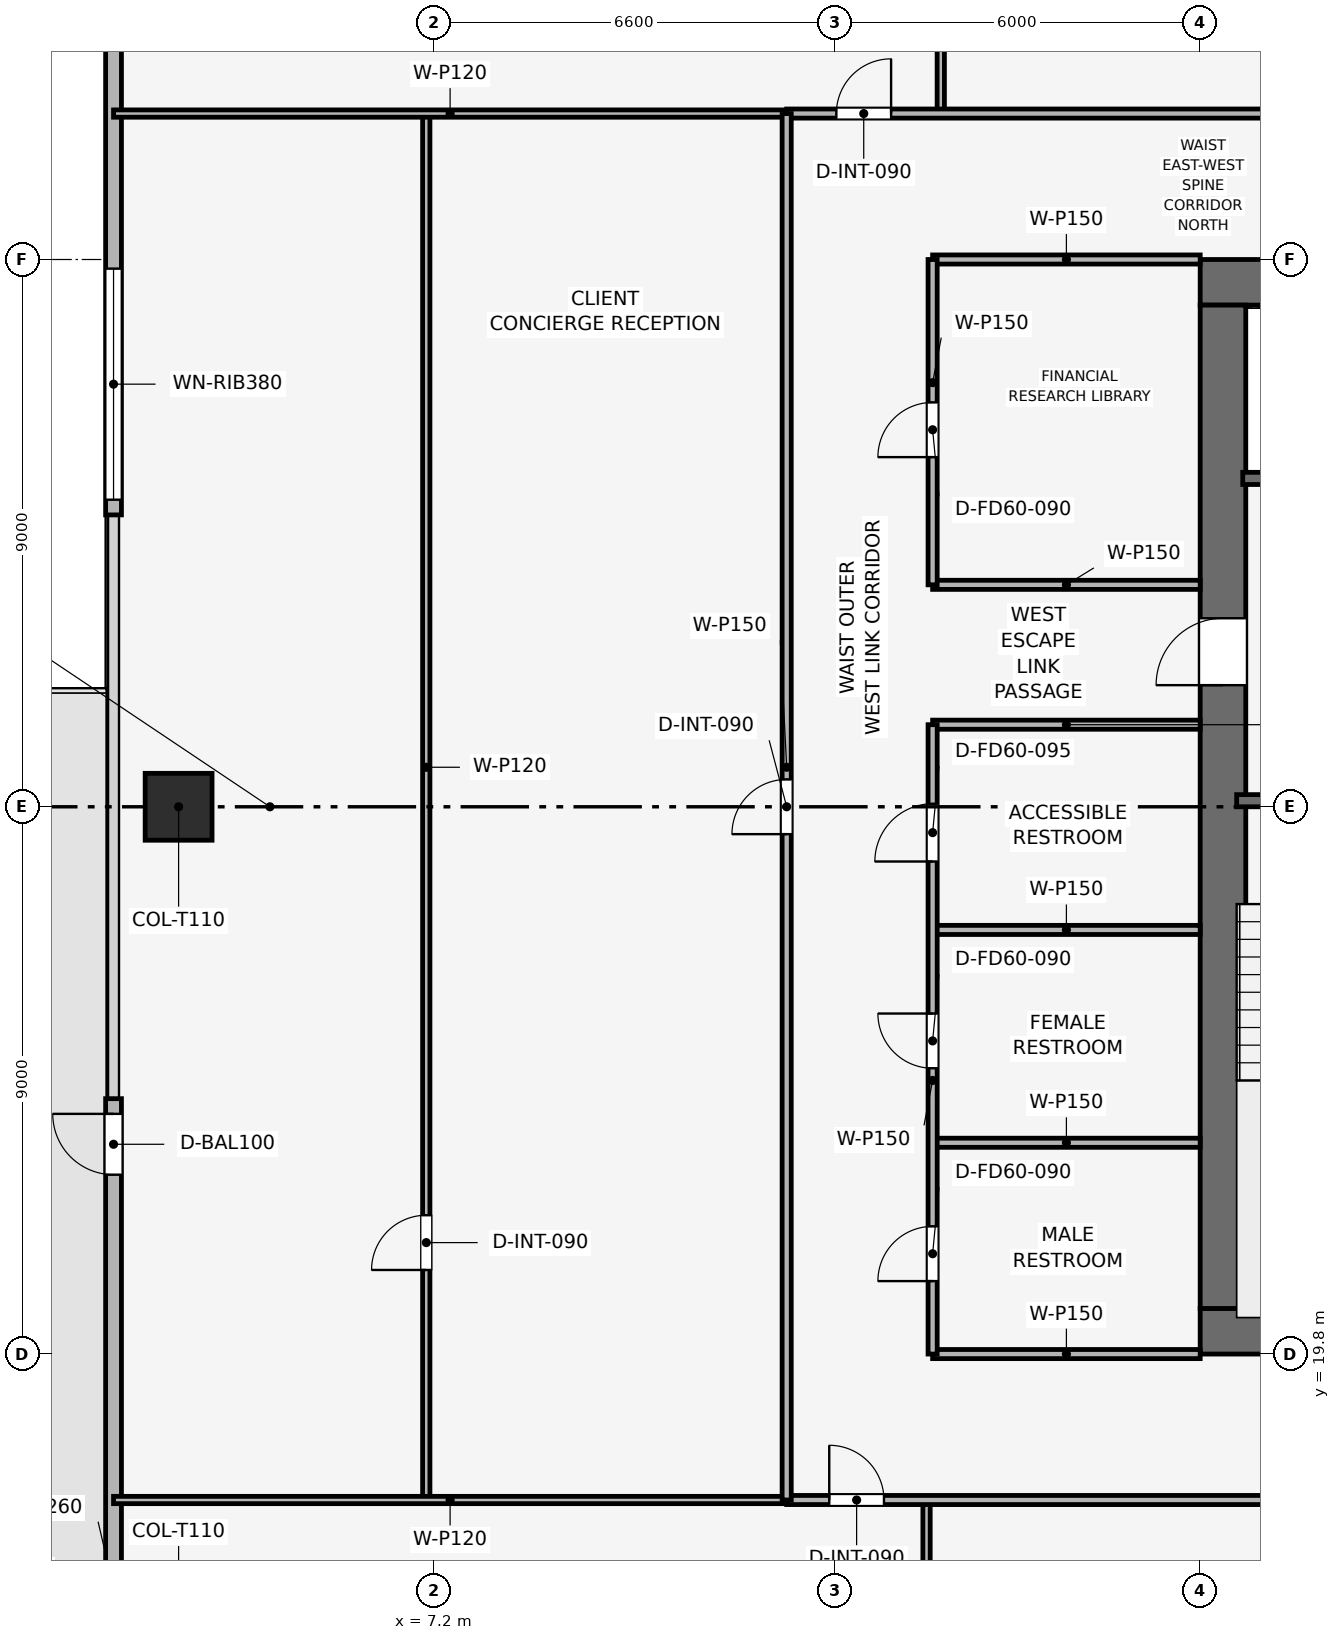
"""IFC4 building model, lengths in metres.
Left out: names, types, materials, properties, quantities, classifications, styles, units other than length and angle.
Written with IfcOpenShell. Run it as: python <this file> out.ifc"""

import sys

from ifc_helpers import new_model, si_unit, direction, frame, frame_2d, origin, origin_2d, place, context, subcontext, project, spatial, rectangle, extrude, element, fill, save


model = new_model("IFC4")
c1 = context("Model", 3, precision=1e-05, world=origin(), true_north=direction((0.0, 1.0)))
c2 = subcontext(c1, "Body", "Model", "MODEL_VIEW")
j1 = project(units=[si_unit("LENGTHUNIT", "METRE"), si_unit("PLANEANGLEUNIT", "RADIAN")], contexts=[c1])
p1 = place(None, origin())
s1 = spatial("IfcSite", under=j1, at=p1, CompositionType="ELEMENT")
p2 = place(p1, origin())
s2 = spatial("IfcBuilding", under=s1, at=p2, CompositionType="ELEMENT")
p3 = place(p2, frame((0.0, 0.0, 226.2)))
s3 = spatial("IfcBuildingStorey", under=s2, at=p3, CompositionType="ELEMENT", Elevation=226.2)
p4 = place(p3, frame((19.8, 20.175, 0.0), z_axis=(0.0, 0.0, 1.0), x_axis=(1.0, 0.0, 0.0)))
e1 = element("IfcWall", 1, at=p4, inside=s3, PredefinedType="SHEAR", context=c2, shape_type="SweptSolid", body=[
    extrude(rectangle(XDim=18.0, YDim=0.75, at=frame_2d((9.0, 0.0))), origin(), (0.0, 0.0, 1.0), 3.75),
])
p5 = place(p4, frame((8.4, 0.0, 0.0)))
e2 = element("IfcOpeningElement", 2, at=p5, cuts=e1, PredefinedType="OPENING", context=c2, shape_type="SweptSolid", body=[
    extrude(rectangle(XDim=1.2, YDim=2.2, at=frame_2d((0.6, 1.1))), frame((0.0, 0.385, 0.0), z_axis=(0.0, -1.0, 0.0), x_axis=(1.0, 0.0, 0.0)), (0.0, 0.0, 1.0), 0.77),
])
p6 = place(p3, frame((19.8, 37.425, 0.0), z_axis=(0.0, 0.0, 1.0), x_axis=(1.0, 0.0, 0.0)))
e3 = element("IfcWall", 3, at=p6, inside=s3, PredefinedType="SHEAR", context=c2, shape_type="SweptSolid", body=[
    extrude(rectangle(XDim=18.0, YDim=0.75, at=frame_2d((9.0, 0.0))), origin(), (0.0, 0.0, 1.0), 3.75),
])
p7 = place(p6, frame((7.05, 0.0, 0.0)))
e4 = element("IfcOpeningElement", 4, at=p7, cuts=e3, PredefinedType="OPENING", context=c2, shape_type="SweptSolid", body=[
    extrude(rectangle(XDim=1.1, YDim=2.15, at=frame_2d((0.55, 1.075))), frame((0.0, 0.385, 0.0), z_axis=(0.0, -1.0, 0.0), x_axis=(1.0, 0.0, 0.0)), (0.0, 0.0, 1.0), 0.77),
])
p8 = place(p3, frame((20.175, 20.55, 0.0), z_axis=(0.0, 0.0, 1.0), x_axis=(0.0, 1.0, 0.0)))
e5 = element("IfcWall", 5, at=p8, inside=s3, PredefinedType="SHEAR", context=c2, shape_type="SweptSolid", body=[
    extrude(rectangle(XDim=16.5, YDim=0.75, at=frame_2d((8.25, 0.0))), origin(), (0.0, 0.0, 1.0), 3.75),
])
p9 = place(p8, frame((10.25, 0.0, 0.0)))
e6 = element("IfcOpeningElement", 6, at=p9, cuts=e5, PredefinedType="OPENING", context=c2, shape_type="SweptSolid", body=[
    extrude(rectangle(XDim=1.1, YDim=2.15, at=frame_2d((0.55, 1.075))), frame((0.0, 0.385, 0.0), z_axis=(0.0, -1.0, 0.0), x_axis=(1.0, 0.0, 0.0)), (0.0, 0.0, 1.0), 0.77),
])
p10 = place(p3, frame((3.0, 28.8, 0.003), z_axis=(0.0, 0.0, 1.0), x_axis=(1.0, 0.0, 0.0)))
e7 = element("IfcColumn", 7, at=p10, inside=s3, PredefinedType="COLUMN", context=c2, shape_type="SweptSolid", body=[
    extrude(rectangle(XDim=1.1, YDim=1.1, at=origin_2d()), origin(), (0.0, 0.0, 1.0), 3.494),
])
p11 = place(p3, frame((1.93, 9.3, 0.0), z_axis=(0.0, 0.0, 1.0), x_axis=(0.0, 1.0, 0.0)))
e8 = element("IfcWall", 8, at=p11, inside=s3, PredefinedType="SOLIDWALL", context=c2, shape_type="SweptSolid", body=[
    extrude(rectangle(XDim=14.7, YDim=0.26, at=frame_2d((7.35, 0.0))), origin(), (0.0, 0.0, 1.0), 3.5),
])
p12 = place(p11, frame((13.45, 0.0, 0.0)))
e9 = element("IfcOpeningElement", 9, at=p12, cuts=e8, PredefinedType="OPENING", context=c2, shape_type="SweptSolid", body=[
    extrude(rectangle(XDim=1.0, YDim=2.2, at=frame_2d((0.5, 1.1))), frame((0.0, 0.14, 0.0), z_axis=(0.0, -1.0, 0.0), x_axis=(1.0, 0.0, 0.0)), (0.0, 0.0, 1.0), 0.28),
])
p13 = place(p3, frame((1.93, 33.6, 0.0), z_axis=(0.0, 0.0, 1.0), x_axis=(0.0, 1.0, 0.0)))
e10 = element("IfcWall", 10, at=p13, inside=s3, PredefinedType="SOLIDWALL", context=c2, shape_type="SweptSolid", body=[
    extrude(rectangle(XDim=14.7, YDim=0.26, at=frame_2d((7.35, 0.0))), origin(), (0.0, 0.0, 1.0), 3.5),
])
p14 = place(p13, frame((0.25, 0.0, 0.9)))
e11 = element("IfcOpeningElement", 11, at=p14, cuts=e10, PredefinedType="OPENING", context=c2, shape_type="SweptSolid", body=[
    extrude(rectangle(XDim=3.8, YDim=1.9, at=frame_2d((1.9, 0.95))), frame((0.0, 0.14, 0.0), z_axis=(0.0, -1.0, 0.0), x_axis=(1.0, 0.0, 0.0)), (0.0, 0.0, 1.0), 0.28),
])
p15 = place(p3, frame((20.4, 28.9, 0.0), z_axis=(0.0, 0.0, 1.0), x_axis=(1.0, 0.0, 0.0)))
e12 = element("IfcWall", 12, at=p15, inside=s3, PredefinedType="SHEAR", context=c2, shape_type="SweptSolid", body=[
    extrude(rectangle(XDim=3.15, YDim=0.2, at=frame_2d((1.575, 0.0))), origin(), (0.0, 0.0, 1.0), 3.5),
])
p16 = place(p15, frame((0.8, 0.0, 0.0)))
e13 = element("IfcOpeningElement", 13, at=p16, cuts=e12, PredefinedType="OPENING", context=c2, shape_type="SweptSolid", body=[
    extrude(rectangle(XDim=1.0, YDim=2.1, at=frame_2d((0.5, 1.05))), frame((0.0, 0.11, 0.0), z_axis=(0.0, -1.0, 0.0), x_axis=(1.0, 0.0, 0.0)), (0.0, 0.0, 1.0), 0.22),
])
p17 = place(p3, frame((20.5, 34.2, 0.0), z_axis=(0.0, 0.0, 1.0), x_axis=(1.0, 0.0, 0.0)))
e14 = element("IfcWall", 14, at=p17, inside=s3, PredefinedType="SHEAR", context=c2, shape_type="SweptSolid", body=[
    extrude(rectangle(XDim=3.05, YDim=0.2, at=frame_2d((1.525, 0.0))), origin(), (0.0, 0.0, 1.0), 3.5),
])
p18 = place(p17, frame((0.75, 0.0, 0.0)))
e15 = element("IfcOpeningElement", 15, at=p18, cuts=e14, PredefinedType="OPENING", context=c2, shape_type="SweptSolid", body=[
    extrude(rectangle(XDim=1.1, YDim=2.15, at=frame_2d((0.55, 1.075))), frame((0.0, 0.11, 0.0), z_axis=(0.0, -1.0, 0.0), x_axis=(1.0, 0.0, 0.0)), (0.0, 0.0, 1.0), 0.22),
])
p19 = place(p3, frame((15.4, 19.8, 0.0), z_axis=(0.0, 0.0, 1.0), x_axis=(1.0, 0.0, 0.0)))
e16 = element("IfcWall", 16, at=p19, inside=s3, PredefinedType="PARTITIONING", context=c2, shape_type="SweptSolid", body=[
    extrude(rectangle(XDim=4.4, YDim=0.15, at=frame_2d((2.2, 0.0))), origin(), (0.0, 0.0, 1.0), 3.035),
])
for number, where, z_axis, x_axis in (
    (17, (15.4, 23.275, 0.0), (0.0, 0.0, 1.0), (1.0, 0.0, 0.0)),
    (18, (15.4, 26.775, 0.0), (0.0, 0.0, 1.0), (1.0, 0.0, 0.0)),
    (19, (15.4, 30.15, 0.0), (0.0, 0.0, 1.0), (1.0, 0.0, 0.0)),
    (20, (15.4, 32.45, 0.0), (0.0, 0.0, 1.0), (1.0, 0.0, 0.0)),
):
    element("IfcWall", number, at=place(p3, frame(where, z_axis=z_axis, x_axis=x_axis)), inside=s3, PredefinedType="PARTITIONING", context=c2, shape_type="SweptSolid", body=[
        extrude(rectangle(XDim=4.4, YDim=0.15, at=frame_2d((2.2, 0.0))), origin(), (0.0, 0.0, 1.0), 3.5),
    ])
p20 = place(p3, frame((15.4, 37.8, 0.0), z_axis=(0.0, 0.0, 1.0), x_axis=(1.0, 0.0, 0.0)))
e21 = element("IfcWall", 21, at=p20, inside=s3, PredefinedType="PARTITIONING", context=c2, shape_type="SweptSolid", body=[
    extrude(rectangle(XDim=4.4, YDim=0.15, at=frame_2d((2.2, 0.0))), origin(), (0.0, 0.0, 1.0), 3.035),
])
p21 = place(p3, frame((15.4, 19.8, 0.0), z_axis=(0.0, 0.0, 1.0), x_axis=(0.0, 1.0, 0.0)))
e22 = element("IfcWall", 22, at=p21, inside=s3, PredefinedType="PARTITIONING", context=c2, shape_type="SweptSolid", body=[
    extrude(rectangle(XDim=10.35, YDim=0.15, at=frame_2d((5.175, 0.0))), origin(), (0.0, 0.0, 1.0), 3.035),
])
p22 = place(p21, frame((1.2, 0.0, 0.0)))
e23 = element("IfcOpeningElement", 23, at=p22, cuts=e22, PredefinedType="OPENING", context=c2, shape_type="SweptSolid", body=[
    extrude(rectangle(XDim=0.9, YDim=2.1, at=frame_2d((0.45, 1.05))), frame((0.0, 0.085, 0.0), z_axis=(0.0, -1.0, 0.0), x_axis=(1.0, 0.0, 0.0)), (0.0, 0.0, 1.0), 0.17),
])
p23 = place(p21, frame((4.7, 0.0, 0.0)))
e24 = element("IfcOpeningElement", 24, at=p23, cuts=e22, PredefinedType="OPENING", context=c2, shape_type="SweptSolid", body=[
    extrude(rectangle(XDim=0.9, YDim=2.1, at=frame_2d((0.45, 1.05))), frame((0.0, 0.085, 0.0), z_axis=(0.0, -1.0, 0.0), x_axis=(1.0, 0.0, 0.0)), (0.0, 0.0, 1.0), 0.17),
])
p24 = place(p21, frame((8.1, 0.0, 0.0)))
e25 = element("IfcOpeningElement", 25, at=p24, cuts=e22, PredefinedType="OPENING", context=c2, shape_type="SweptSolid", body=[
    extrude(rectangle(XDim=0.95, YDim=2.1, at=frame_2d((0.475, 1.05))), frame((0.0, 0.085, 0.0), z_axis=(0.0, -1.0, 0.0), x_axis=(1.0, 0.0, 0.0)), (0.0, 0.0, 1.0), 0.17),
])
p25 = place(p3, frame((15.4, 32.45, 0.0), z_axis=(0.0, 0.0, 1.0), x_axis=(0.0, 1.0, 0.0)))
e26 = element("IfcWall", 26, at=p25, inside=s3, PredefinedType="PARTITIONING", context=c2, shape_type="SweptSolid", body=[
    extrude(rectangle(XDim=5.35, YDim=0.15, at=frame_2d((2.675, 0.0))), origin(), (0.0, 0.0, 1.0), 3.035),
])
p26 = place(p25, frame((2.1, 0.0, 0.0)))
e27 = element("IfcOpeningElement", 27, at=p26, cuts=e26, PredefinedType="OPENING", context=c2, shape_type="SweptSolid", body=[
    extrude(rectangle(XDim=0.9, YDim=2.1, at=frame_2d((0.45, 1.05))), frame((0.0, 0.085, 0.0), z_axis=(0.0, -1.0, 0.0), x_axis=(1.0, 0.0, 0.0)), (0.0, 0.0, 1.0), 0.17),
])
for number, where, z_axis, x_axis in (
    (28, (15.3, 1.93, 0.0), (0.0, 0.0, 1.0), (0.0, 1.0, 0.0)),
    (29, (15.534, 40.2, 0.0), (0.0, 0.0, 1.0), (0.0, 1.0, 0.0)),
):
    element("IfcWall", number, at=place(p3, frame(where, z_axis=z_axis, x_axis=x_axis)), inside=s3, PredefinedType="PARTITIONING", context=c2, shape_type="SweptSolid", body=[
        extrude(rectangle(XDim=15.47, YDim=0.12, at=frame_2d((7.735, 0.0))), origin(), (0.0, 0.0, 1.0), 2.885),
    ])
p27 = place(p3, frame((7.073, 17.4, 0.0), z_axis=(0.0, 0.0, 1.0), x_axis=(0.0, 1.0, 0.0)))
e30 = element("IfcWall", 30, at=p27, inside=s3, PredefinedType="PARTITIONING", context=c2, shape_type="SweptSolid", body=[
    extrude(rectangle(XDim=22.8, YDim=0.12, at=frame_2d((11.4, 0.0))), origin(), (0.0, 0.0, 1.0), 3.035),
])
p28 = place(p27, frame((3.783, 0.0, 0.0)))
e31 = element("IfcOpeningElement", 31, at=p28, cuts=e30, PredefinedType="OPENING", context=c2, shape_type="SweptSolid", body=[
    extrude(rectangle(XDim=0.9, YDim=2.1, at=frame_2d((0.45, 1.05))), frame((0.0, 0.07, 0.0), z_axis=(0.0, -1.0, 0.0), x_axis=(1.0, 0.0, 0.0)), (0.0, 0.0, 1.0), 0.14),
])
for number, where, z_axis, x_axis in (
    (32, (1.93, 17.4, 0.0), (0.0, 0.0, 1.0), (1.0, 0.0, 0.0)),
    (33, (1.93, 40.2, 0.0), (0.0, 0.0, 1.0), (1.0, 0.0, 0.0)),
):
    element("IfcWall", number, at=place(p3, frame(where, z_axis=z_axis, x_axis=x_axis)), inside=s3, PredefinedType="PARTITIONING", context=c2, shape_type="SweptSolid", body=[
        extrude(rectangle(XDim=11.07, YDim=0.12, at=frame_2d((5.535, 0.0))), origin(), (0.0, 0.0, 1.0), 2.885),
    ])
p29 = place(p3, frame((13.0, 17.4, 0.0), z_axis=(0.0, 0.0, 1.0), x_axis=(1.0, 0.0, 0.0)))
e34 = element("IfcWall", 34, at=p29, inside=s3, PredefinedType="PARTITIONING", context=c2, shape_type="SweptSolid", body=[
    extrude(rectangle(XDim=31.6, YDim=0.15, at=frame_2d((15.8, 0.0))), origin(), (0.0, 0.0, 1.0), 3.035),
])
p30 = place(p29, frame((0.7, 0.0, 0.0)))
e35 = element("IfcOpeningElement", 35, at=p30, cuts=e34, PredefinedType="OPENING", context=c2, shape_type="SweptSolid", body=[
    extrude(rectangle(XDim=0.9, YDim=2.1, at=frame_2d((0.45, 1.05))), frame((0.0, 0.085, 0.0), z_axis=(0.0, -1.0, 0.0), x_axis=(1.0, 0.0, 0.0)), (0.0, 0.0, 1.0), 0.17),
])
p31 = place(p29, frame((8.483, 0.0, 0.0)))
e36 = element("IfcOpeningElement", 36, at=p31, cuts=e34, PredefinedType="OPENING", context=c2, shape_type="SweptSolid", body=[
    extrude(rectangle(XDim=0.9, YDim=2.1, at=frame_2d((0.45, 1.05))), frame((0.0, 0.085, 0.0), z_axis=(0.0, -1.0, 0.0), x_axis=(1.0, 0.0, 0.0)), (0.0, 0.0, 1.0), 0.17),
])
p32 = place(p29, frame((23.133, 0.0, 0.0)))
e37 = element("IfcOpeningElement", 37, at=p32, cuts=e34, PredefinedType="OPENING", context=c2, shape_type="SweptSolid", body=[
    extrude(rectangle(XDim=0.9, YDim=2.1, at=frame_2d((0.45, 1.05))), frame((0.0, 0.085, 0.0), z_axis=(0.0, -1.0, 0.0), x_axis=(1.0, 0.0, 0.0)), (0.0, 0.0, 1.0), 0.17),
])
p33 = place(p3, frame((13.0, 40.2, 0.0), z_axis=(0.0, 0.0, 1.0), x_axis=(1.0, 0.0, 0.0)))
e38 = element("IfcWall", 38, at=p33, inside=s3, PredefinedType="PARTITIONING", context=c2, shape_type="SweptSolid", body=[
    extrude(rectangle(XDim=31.6, YDim=0.15, at=frame_2d((15.8, 0.0))), origin(), (0.0, 0.0, 1.0), 3.035),
])
p34 = place(p33, frame((0.817, 0.0, 0.0)))
e39 = element("IfcOpeningElement", 39, at=p34, cuts=e38, PredefinedType="OPENING", context=c2, shape_type="SweptSolid", body=[
    extrude(rectangle(XDim=0.9, YDim=2.1, at=frame_2d((0.45, 1.05))), frame((0.0, 0.085, 0.0), z_axis=(0.0, -1.0, 0.0), x_axis=(1.0, 0.0, 0.0)), (0.0, 0.0, 1.0), 0.17),
])
p35 = place(p33, frame((8.75, 0.0, 0.0)))
e40 = element("IfcOpeningElement", 40, at=p35, cuts=e38, PredefinedType="OPENING", context=c2, shape_type="SweptSolid", body=[
    extrude(rectangle(XDim=0.9, YDim=2.1, at=frame_2d((0.45, 1.05))), frame((0.0, 0.085, 0.0), z_axis=(0.0, -1.0, 0.0), x_axis=(1.0, 0.0, 0.0)), (0.0, 0.0, 1.0), 0.17),
])
p36 = place(p33, frame((23.282, 0.0, 0.0)))
e41 = element("IfcOpeningElement", 41, at=p36, cuts=e38, PredefinedType="OPENING", context=c2, shape_type="SweptSolid", body=[
    extrude(rectangle(XDim=0.9, YDim=2.1, at=frame_2d((0.45, 1.05))), frame((0.0, 0.085, 0.0), z_axis=(0.0, -1.0, 0.0), x_axis=(1.0, 0.0, 0.0)), (0.0, 0.0, 1.0), 0.17),
])
p37 = place(p3, frame((13.0, 17.4, 0.0), z_axis=(0.0, 0.0, 1.0), x_axis=(0.0, 1.0, 0.0)))
e42 = element("IfcWall", 42, at=p37, inside=s3, PredefinedType="PARTITIONING", context=c2, shape_type="SweptSolid", body=[
    extrude(rectangle(XDim=22.8, YDim=0.15, at=frame_2d((11.4, 0.0))), origin(), (0.0, 0.0, 1.0), 3.035),
])
p38 = place(p37, frame((10.95, 0.0, 0.0)))
e43 = element("IfcOpeningElement", 43, at=p38, cuts=e42, PredefinedType="OPENING", context=c2, shape_type="SweptSolid", body=[
    extrude(rectangle(XDim=0.9, YDim=2.1, at=frame_2d((0.45, 1.05))), frame((0.0, 0.085, 0.0), z_axis=(0.0, -1.0, 0.0), x_axis=(1.0, 0.0, 0.0)), (0.0, 0.0, 1.0), 0.17),
])
p39 = place(p12, origin())
e44 = element("IfcDoor", 44, at=p39, inside=s3, OperationType="SINGLE_SWING_RIGHT", PredefinedType="DOOR", context=c2, shape_type="SweptSolid", body=[
    extrude(rectangle(XDim=1.0, YDim=2.2, at=frame_2d((0.5, 1.1))), frame((0.0, 0.025, 0.0), z_axis=(0.0, -1.0, 0.0), x_axis=(1.0, 0.0, 0.0)), (0.0, 0.0, 1.0), 0.05),
])
fill(e9, e44)
p40 = place(p14, origin())
e45 = element("IfcWindow", 45, at=p40, inside=s3, PartitioningType="SINGLE_PANEL", PredefinedType="WINDOW", context=c2, shape_type="SweptSolid", body=[
    extrude(rectangle(XDim=3.8, YDim=1.9, at=frame_2d((1.9, 0.95))), frame((0.0, 0.03, 0.0), z_axis=(0.0, -1.0, 0.0), x_axis=(1.0, 0.0, 0.0)), (0.0, 0.0, 1.0), 0.06),
])
fill(e11, e45)
p41 = place(p22, origin())
e46 = element("IfcDoor", 46, at=p41, inside=s3, OperationType="SINGLE_SWING_LEFT", PredefinedType="DOOR", context=c2, shape_type="SweptSolid", body=[
    extrude(rectangle(XDim=0.9, YDim=2.1, at=frame_2d((0.45, 1.05))), frame((0.0, 0.025, 0.0), z_axis=(0.0, -1.0, 0.0), x_axis=(1.0, 0.0, 0.0)), (0.0, 0.0, 1.0), 0.05),
])
fill(e23, e46)
p42 = place(p23, origin())
e47 = element("IfcDoor", 47, at=p42, inside=s3, OperationType="SINGLE_SWING_RIGHT", PredefinedType="DOOR", context=c2, shape_type="SweptSolid", body=[
    extrude(rectangle(XDim=0.9, YDim=2.1, at=frame_2d((0.45, 1.05))), frame((0.0, 0.025, 0.0), z_axis=(0.0, -1.0, 0.0), x_axis=(1.0, 0.0, 0.0)), (0.0, 0.0, 1.0), 0.05),
])
fill(e24, e47)
p43 = place(p24, origin())
e48 = element("IfcDoor", 48, at=p43, inside=s3, OperationType="SINGLE_SWING_LEFT", PredefinedType="DOOR", context=c2, shape_type="SweptSolid", body=[
    extrude(rectangle(XDim=0.95, YDim=2.1, at=frame_2d((0.475, 1.05))), frame((0.0, 0.025, 0.0), z_axis=(0.0, -1.0, 0.0), x_axis=(1.0, 0.0, 0.0)), (0.0, 0.0, 1.0), 0.05),
])
fill(e25, e48)
p44 = place(p26, origin())
e49 = element("IfcDoor", 49, at=p44, inside=s3, OperationType="SINGLE_SWING_LEFT", PredefinedType="DOOR", context=c2, shape_type="SweptSolid", body=[
    extrude(rectangle(XDim=0.9, YDim=2.1, at=frame_2d((0.45, 1.05))), frame((0.0, 0.025, 0.0), z_axis=(0.0, -1.0, 0.0), x_axis=(1.0, 0.0, 0.0)), (0.0, 0.0, 1.0), 0.05),
])
fill(e27, e49)
p45 = place(p28, origin())
e50 = element("IfcDoor", 50, at=p45, inside=s3, OperationType="SINGLE_SWING_LEFT", PredefinedType="DOOR", context=c2, shape_type="SweptSolid", body=[
    extrude(rectangle(XDim=0.9, YDim=2.1, at=frame_2d((0.45, 1.05))), frame((0.0, 0.025, 0.0), z_axis=(0.0, -1.0, 0.0), x_axis=(1.0, 0.0, 0.0)), (0.0, 0.0, 1.0), 0.05),
])
fill(e31, e50)
p46 = place(p30, origin())
e51 = element("IfcDoor", 51, at=p46, inside=s3, OperationType="SINGLE_SWING_LEFT", PredefinedType="DOOR", context=c2, shape_type="SweptSolid", body=[
    extrude(rectangle(XDim=0.9, YDim=2.1, at=frame_2d((0.45, 1.05))), frame((0.0, 0.025, 0.0), z_axis=(0.0, -1.0, 0.0), x_axis=(1.0, 0.0, 0.0)), (0.0, 0.0, 1.0), 0.05),
])
fill(e35, e51)
p47 = place(p34, origin())
e52 = element("IfcDoor", 52, at=p47, inside=s3, OperationType="SINGLE_SWING_RIGHT", PredefinedType="DOOR", context=c2, shape_type="SweptSolid", body=[
    extrude(rectangle(XDim=0.9, YDim=2.1, at=frame_2d((0.45, 1.05))), frame((0.0, 0.025, 0.0), z_axis=(0.0, -1.0, 0.0), x_axis=(1.0, 0.0, 0.0)), (0.0, 0.0, 1.0), 0.05),
])
fill(e39, e52)
p48 = place(p38, origin())
e53 = element("IfcDoor", 53, at=p48, inside=s3, OperationType="SINGLE_SWING_LEFT", PredefinedType="DOOR", context=c2, shape_type="SweptSolid", body=[
    extrude(rectangle(XDim=0.9, YDim=2.1, at=frame_2d((0.45, 1.05))), frame((0.0, 0.025, 0.0), z_axis=(0.0, -1.0, 0.0), x_axis=(1.0, 0.0, 0.0)), (0.0, 0.0, 1.0), 0.05),
])
fill(e43, e53)
p49 = place(p9, origin())
e54 = element("IfcDoor", 54, at=p49, inside=s3, OperationType="SINGLE_SWING_LEFT", PredefinedType="DOOR", context=c2, shape_type="SweptSolid", body=[
    extrude(rectangle(XDim=1.1, YDim=2.15, at=frame_2d((0.55, 1.075))), frame((0.0, 0.025, 0.0), z_axis=(0.0, -1.0, 0.0), x_axis=(1.0, 0.0, 0.0)), (0.0, 0.0, 1.0), 0.05),
])
fill(e6, e54)
save(model, sys.argv[1])
